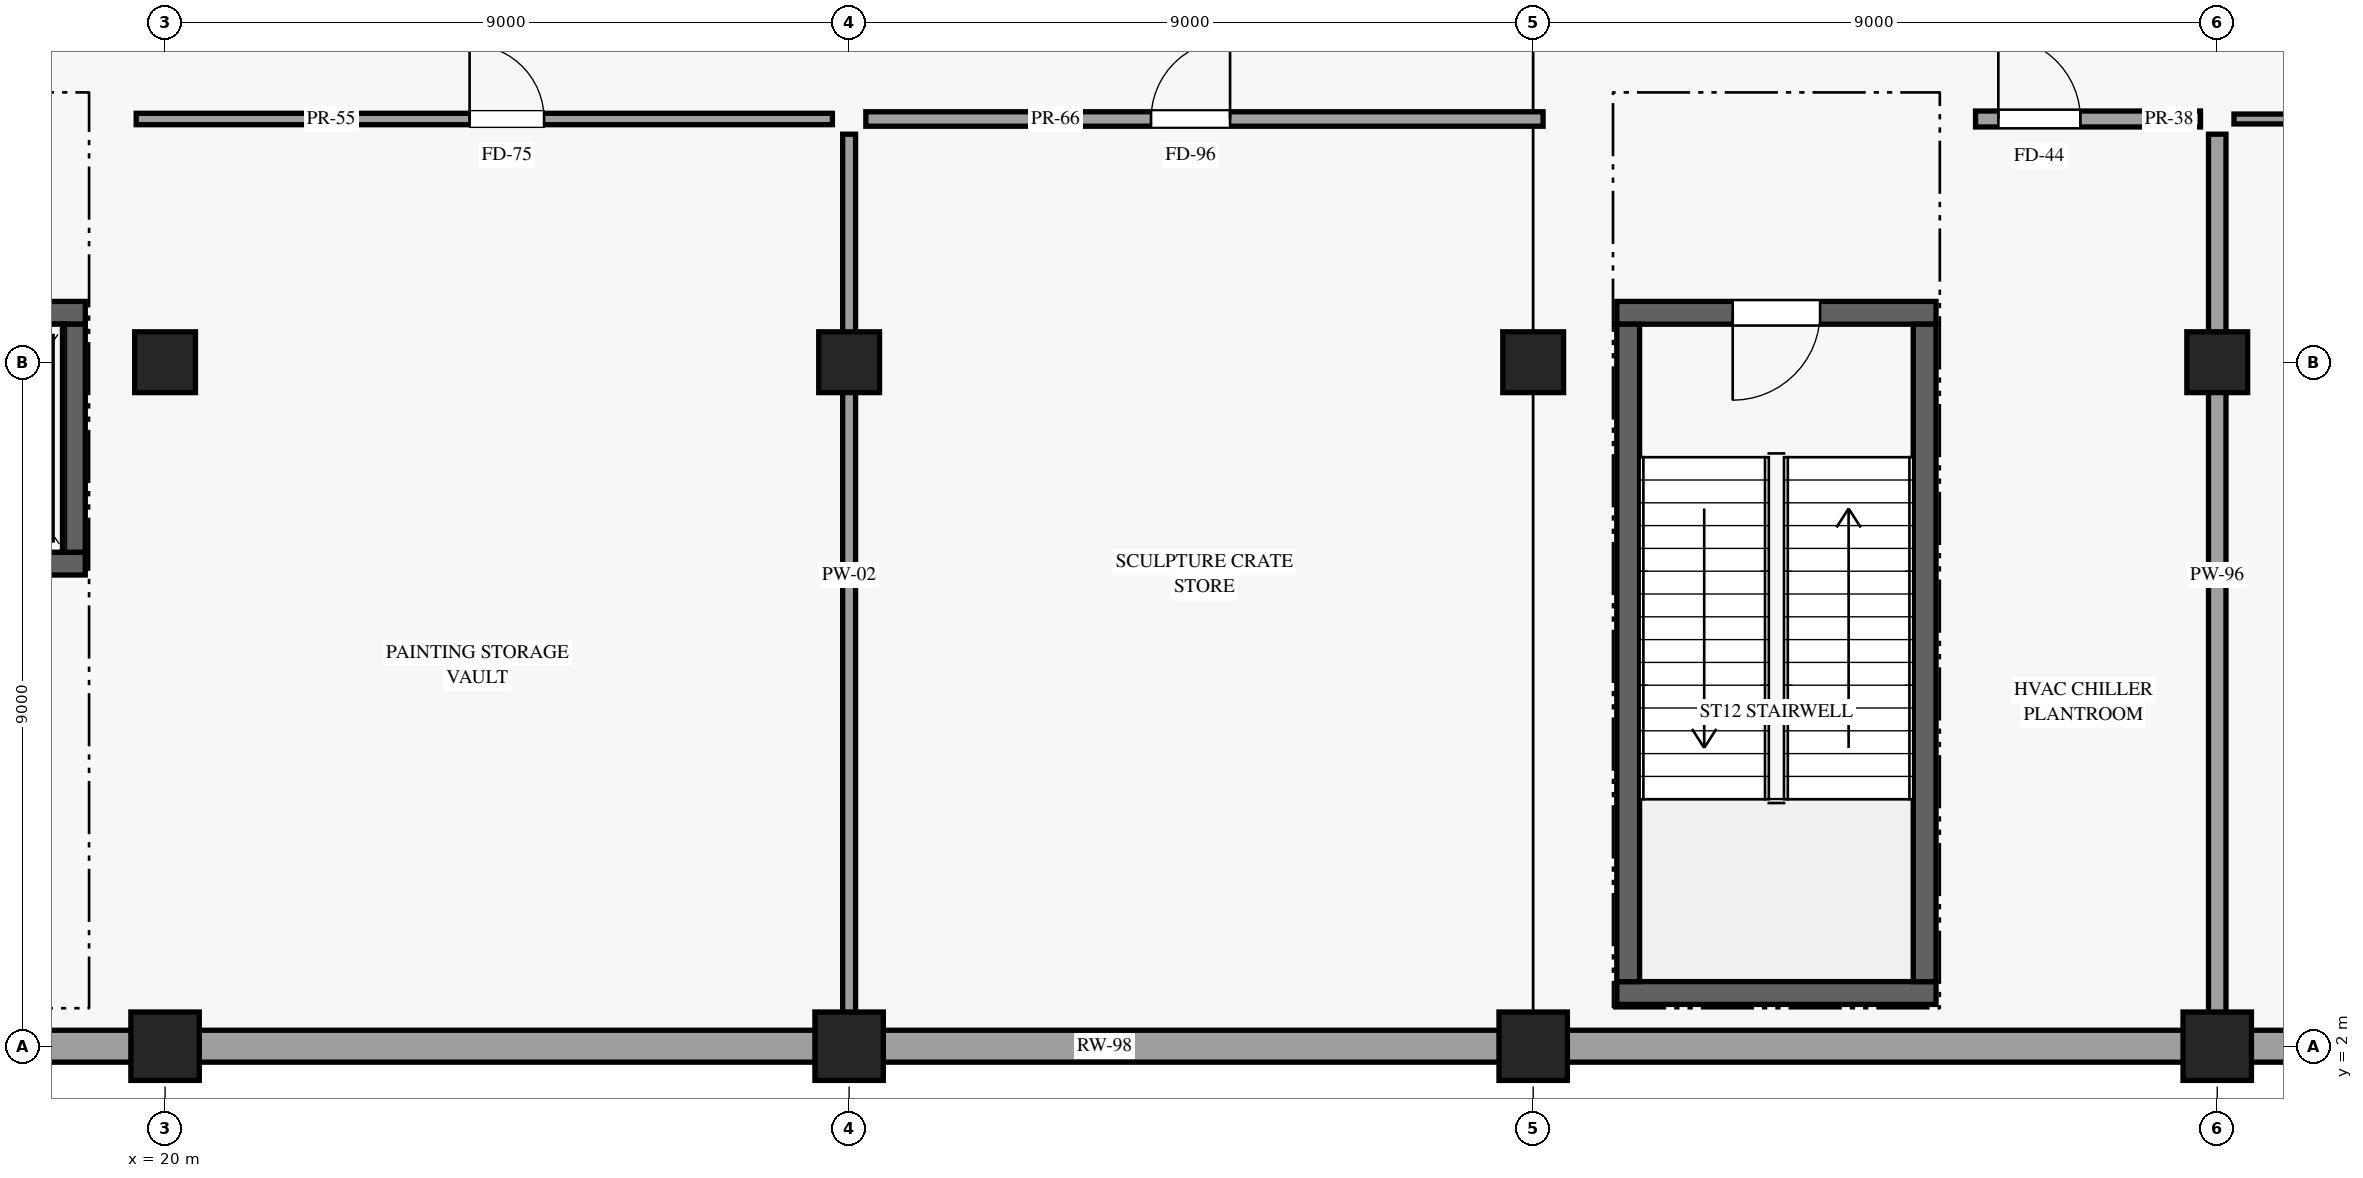
"""IFC4 building model, lengths in metres.
Left out: names, types, materials, properties, quantities, classifications, styles, units other than length and angle.
Written with IfcOpenShell. Run it as: python <this file> out.ifc"""

import sys

from ifc_helpers import new_model, si_unit, direction, frame, frame_2d, origin, origin_2d, place, context, subcontext, project, spatial, rectangle, extrude, element, fill, save


model = new_model("IFC4")
c1 = context("Model", 3, precision=1e-05, world=origin(), true_north=direction((0.0, 1.0)))
c2 = subcontext(c1, "Body", "Model", "MODEL_VIEW")
j1 = project(units=[si_unit("LENGTHUNIT", "METRE"), si_unit("PLANEANGLEUNIT", "RADIAN")], contexts=[c1])
p1 = place(None, origin())
s1 = spatial("IfcSite", under=j1, at=p1, CompositionType="ELEMENT")
p2 = place(p1, origin())
s2 = spatial("IfcBuilding", under=s1, at=p2, CompositionType="ELEMENT")
p3 = place(p2, frame((0.0, 0.0, -4.8)))
s3 = spatial("IfcBuildingStorey", under=s2, at=p3, CompositionType="ELEMENT", Elevation=-4.8)
p4 = place(p3, frame((20.0, 2.0, 0.0), z_axis=(0.0, 0.0, 1.0), x_axis=(1.0, 0.0, 0.0)))
e1 = element("IfcColumn", 1, at=p4, inside=s3, PredefinedType="COLUMN", context=c2, shape_type="SweptSolid", body=[
    extrude(rectangle(XDim=0.9, YDim=0.9, at=origin_2d()), origin(), (0.0, 0.0, 1.0), 4.8),
])
p5 = place(p3, frame((20.0, 11.0, 0.0), z_axis=(0.0, 0.0, 1.0), x_axis=(1.0, 0.0, 0.0)))
e2 = element("IfcColumn", 2, at=p5, inside=s3, PredefinedType="COLUMN", context=c2, shape_type="SweptSolid", body=[
    extrude(rectangle(XDim=0.8, YDim=0.8, at=origin_2d()), origin(), (0.0, 0.0, 1.0), 4.8),
])
p6 = place(p3, frame((29.0, 2.0, 0.0), z_axis=(0.0, 0.0, 1.0), x_axis=(1.0, 0.0, 0.0)))
e3 = element("IfcColumn", 3, at=p6, inside=s3, PredefinedType="COLUMN", context=c2, shape_type="SweptSolid", body=[
    extrude(rectangle(XDim=0.9, YDim=0.9, at=origin_2d()), origin(), (0.0, 0.0, 1.0), 4.8),
])
p7 = place(p3, frame((29.0, 11.0, 0.0), z_axis=(0.0, 0.0, 1.0), x_axis=(1.0, 0.0, 0.0)))
e4 = element("IfcColumn", 4, at=p7, inside=s3, PredefinedType="COLUMN", context=c2, shape_type="SweptSolid", body=[
    extrude(rectangle(XDim=0.8, YDim=0.8, at=origin_2d()), origin(), (0.0, 0.0, 1.0), 4.8),
])
p8 = place(p3, frame((38.0, 2.0, 0.0), z_axis=(0.0, 0.0, 1.0), x_axis=(1.0, 0.0, 0.0)))
e5 = element("IfcColumn", 5, at=p8, inside=s3, PredefinedType="COLUMN", context=c2, shape_type="SweptSolid", body=[
    extrude(rectangle(XDim=0.9, YDim=0.9, at=origin_2d()), origin(), (0.0, 0.0, 1.0), 4.8),
])
p9 = place(p3, frame((38.0, 11.0, 0.0), z_axis=(0.0, 0.0, 1.0), x_axis=(1.0, 0.0, 0.0)))
e6 = element("IfcColumn", 6, at=p9, inside=s3, PredefinedType="COLUMN", context=c2, shape_type="SweptSolid", body=[
    extrude(rectangle(XDim=0.8, YDim=0.8, at=origin_2d()), origin(), (0.0, 0.0, 1.0), 4.8),
])
p10 = place(p3, frame((47.0, 2.0, 0.0), z_axis=(0.0, 0.0, 1.0), x_axis=(1.0, 0.0, 0.0)))
e7 = element("IfcColumn", 7, at=p10, inside=s3, PredefinedType="COLUMN", context=c2, shape_type="SweptSolid", body=[
    extrude(rectangle(XDim=0.9, YDim=0.9, at=origin_2d()), origin(), (0.0, 0.0, 1.0), 4.8),
])
p11 = place(p3, frame((47.0, 11.0, 0.0), z_axis=(0.0, 0.0, 1.0), x_axis=(1.0, 0.0, 0.0)))
e8 = element("IfcColumn", 8, at=p11, inside=s3, PredefinedType="COLUMN", context=c2, shape_type="SweptSolid", body=[
    extrude(rectangle(XDim=0.8, YDim=0.8, at=origin_2d()), origin(), (0.0, 0.0, 1.0), 4.8),
])
p12 = place(p3, frame((10.79, 2.0, 0.0), z_axis=(0.0, 0.0, 1.0), x_axis=(1.0, 0.0, 0.0)))
e9 = element("IfcWall", 9, at=p12, inside=s3, PredefinedType="SOLIDWALL", context=c2, shape_type="SweptSolid", body=[
    extrude(rectangle(XDim=45.42, YDim=0.42, at=frame_2d((22.71, 0.0))), origin(), (0.0, 0.0, 1.0), 3.215),
])
p13 = place(p3, frame((16.35, 11.65, 0.0), z_axis=(0.0, 0.0, 1.0), x_axis=(1.0, 0.0, 0.0)))
e10 = element("IfcWall", 10, at=p13, inside=s3, PredefinedType="SHEAR", context=c2, shape_type="SweptSolid", body=[
    extrude(rectangle(XDim=2.6, YDim=0.3, at=frame_2d((1.3, 0.0))), origin(), (0.0, 0.0, 1.0), 4.48),
])
p14 = place(p13, frame((0.75, 0.0, 0.0)))
e11 = element("IfcOpeningElement", 11, at=p14, cuts=e10, PredefinedType="OPENING", context=c2, shape_type="SweptSolid", body=[
    extrude(rectangle(XDim=1.1, YDim=2.2, at=frame_2d((0.55, 1.1))), frame((0.0, 0.16, 0.0), z_axis=(0.0, -1.0, 0.0), x_axis=(1.0, 0.0, 0.0)), (0.0, 0.0, 1.0), 0.32),
])
p15 = place(p3, frame((16.35, 8.35, 0.0), z_axis=(0.0, 0.0, 1.0), x_axis=(1.0, 0.0, 0.0)))
e12 = element("IfcWall", 12, at=p15, inside=s3, PredefinedType="SHEAR", context=c2, shape_type="SweptSolid", body=[
    extrude(rectangle(XDim=2.6, YDim=0.3, at=frame_2d((1.3, 0.0))), origin(), (0.0, 0.0, 1.0), 4.48),
])
p16 = place(p3, frame((18.8, 8.5, 0.0), z_axis=(0.0, 0.0, 1.0), x_axis=(0.0, 1.0, 0.0)))
e13 = element("IfcWall", 13, at=p16, inside=s3, PredefinedType="SHEAR", context=c2, shape_type="SweptSolid", body=[
    extrude(rectangle(XDim=3.0, YDim=0.3, at=frame_2d((1.5, 0.0))), origin(), (0.0, 0.0, 1.0), 4.48),
])
p17 = place(p3, frame((39.1, 11.65, 0.0), z_axis=(0.0, 0.0, 1.0), x_axis=(1.0, 0.0, 0.0)))
e14 = element("IfcWall", 14, at=p17, inside=s3, PredefinedType="SHEAR", context=c2, shape_type="SweptSolid", body=[
    extrude(rectangle(XDim=4.2, YDim=0.3, at=frame_2d((2.1, 0.0))), origin(), (0.0, 0.0, 1.0), 4.48),
])
p18 = place(p17, frame((2.675, 0.0, 0.0), z_axis=(0.0, 0.0, 1.0), x_axis=(-1.0, 0.0, 0.0)))
e15 = element("IfcOpeningElement", 15, at=p18, cuts=e14, PredefinedType="OPENING", context=c2, shape_type="SweptSolid", body=[
    extrude(rectangle(XDim=1.15, YDim=2.2, at=frame_2d((0.575, 1.1))), frame((0.0, 0.16, 0.0), z_axis=(0.0, -1.0, 0.0), x_axis=(1.0, 0.0, 0.0)), (0.0, 0.0, 1.0), 0.32),
])
p19 = place(p3, frame((39.1, 2.7, 0.0), z_axis=(0.0, 0.0, 1.0), x_axis=(1.0, 0.0, 0.0)))
e16 = element("IfcWall", 16, at=p19, inside=s3, PredefinedType="SHEAR", context=c2, shape_type="SweptSolid", body=[
    extrude(rectangle(XDim=4.2, YDim=0.3, at=frame_2d((2.1, 0.0))), origin(), (0.0, 0.0, 1.0), 4.48),
])
for number, where, z_axis, x_axis in (
    (17, (39.25, 2.85, 0.0), (0.0, 0.0, 1.0), (0.0, 1.0, 0.0)),
    (18, (43.15, 2.85, 0.0), (0.0, 0.0, 1.0), (0.0, 1.0, 0.0)),
):
    element("IfcWall", number, at=place(p3, frame(where, z_axis=z_axis, x_axis=x_axis)), inside=s3, PredefinedType="SHEAR", context=c2, shape_type="SweptSolid", body=[
        extrude(rectangle(XDim=8.65, YDim=0.3, at=frame_2d((4.325, 0.0))), origin(), (0.0, 0.0, 1.0), 4.48),
    ])
p20 = place(p3, frame((19.62, 14.2, 0.0), z_axis=(0.0, 0.0, 1.0), x_axis=(1.0, 0.0, 0.0)))
e19 = element("IfcWall", 19, at=p20, inside=s3, PredefinedType="PARTITIONING", context=c2, shape_type="SweptSolid", body=[
    extrude(rectangle(XDim=9.16, YDim=0.15, at=frame_2d((4.58, 0.0))), origin(), (0.0, 0.0, 1.0), 3.415),
])
p21 = place(p20, frame((4.386, 0.0, 0.0)))
e20 = element("IfcOpeningElement", 20, at=p21, cuts=e19, PredefinedType="OPENING", context=c2, shape_type="SweptSolid", body=[
    extrude(rectangle(XDim=0.98, YDim=2.18, at=frame_2d((0.49, 1.09))), frame((0.0, 0.085, 0.0), z_axis=(0.0, -1.0, 0.0), x_axis=(1.0, 0.0, 0.0)), (0.0, 0.0, 1.0), 0.17),
])
p22 = place(p3, frame((29.0, 2.4, 0.0), z_axis=(0.0, 0.0, 1.0), x_axis=(0.0, 1.0, 0.0)))
e21 = element("IfcWall", 21, at=p22, inside=s3, PredefinedType="PARTITIONING", context=c2, shape_type="SweptSolid", body=[
    extrude(rectangle(XDim=11.6, YDim=0.17, at=frame_2d((5.8, 0.0))), origin(), (0.0, 0.0, 1.0), 3.415),
])
p23 = place(p3, frame((29.22, 14.2, 0.0), z_axis=(0.0, 0.0, 1.0), x_axis=(1.0, 0.0, 0.0)))
e22 = element("IfcWall", 22, at=p23, inside=s3, PredefinedType="PARTITIONING", context=c2, shape_type="SweptSolid", body=[
    extrude(rectangle(XDim=8.91, YDim=0.19, at=frame_2d((4.455, 0.0))), origin(), (0.0, 0.0, 1.0), 3.415),
])
p24 = place(p23, frame((3.752, 0.0, 0.0)))
e23 = element("IfcOpeningElement", 23, at=p24, cuts=e22, PredefinedType="OPENING", context=c2, shape_type="SweptSolid", body=[
    extrude(rectangle(XDim=1.04, YDim=2.22, at=frame_2d((0.52, 1.11))), frame((0.0, 0.105, 0.0), z_axis=(0.0, -1.0, 0.0), x_axis=(1.0, 0.0, 0.0)), (0.0, 0.0, 1.0), 0.21),
])
p25 = place(p3, frame((43.82, 14.2, 0.0), z_axis=(0.0, 0.0, 1.0), x_axis=(1.0, 0.0, 0.0)))
e24 = element("IfcWall", 24, at=p25, inside=s3, PredefinedType="PARTITIONING", context=c2, shape_type="SweptSolid", body=[
    extrude(rectangle(XDim=2.96, YDim=0.21, at=frame_2d((1.48, 0.0))), origin(), (0.0, 0.0, 1.0), 3.415),
])
p26 = place(p25, frame((0.3, 0.0, 0.0)))
e25 = element("IfcOpeningElement", 25, at=p26, cuts=e24, PredefinedType="OPENING", context=c2, shape_type="SweptSolid", body=[
    extrude(rectangle(XDim=1.08, YDim=2.24, at=frame_2d((0.54, 1.12))), frame((0.0, 0.115, 0.0), z_axis=(0.0, -1.0, 0.0), x_axis=(1.0, 0.0, 0.0)), (0.0, 0.0, 1.0), 0.23),
])
p27 = place(p3, frame((47.0, 2.4, 0.0), z_axis=(0.0, 0.0, 1.0), x_axis=(0.0, 1.0, 0.0)))
e26 = element("IfcWall", 26, at=p27, inside=s3, PredefinedType="PARTITIONING", context=c2, shape_type="SweptSolid", body=[
    extrude(rectangle(XDim=11.6, YDim=0.23, at=frame_2d((5.8, 0.0))), origin(), (0.0, 0.0, 1.0), 3.415),
])
p28 = place(p3, frame((47.22, 14.2, 0.0), z_axis=(0.0, 0.0, 1.0), x_axis=(1.0, 0.0, 0.0)))
e27 = element("IfcWall", 27, at=p28, inside=s3, PredefinedType="PARTITIONING", context=c2, shape_type="SweptSolid", body=[
    extrude(rectangle(XDim=8.24, YDim=0.13, at=frame_2d((4.12, 0.0))), origin(), (0.0, 0.0, 1.0), 3.415),
])
p29 = place(p28, frame((3.721, 0.0, 0.0)))
e28 = element("IfcOpeningElement", 28, at=p29, cuts=e27, PredefinedType="OPENING", context=c2, shape_type="SweptSolid", body=[
    extrude(rectangle(XDim=1.16, YDim=2.28, at=frame_2d((0.58, 1.14))), frame((0.0, 0.075, 0.0), z_axis=(0.0, -1.0, 0.0), x_axis=(1.0, 0.0, 0.0)), (0.0, 0.0, 1.0), 0.15),
])
p30 = place(p18, origin())
e29 = element("IfcDoor", 29, at=p30, inside=s3, OperationType="SINGLE_SWING_RIGHT", PredefinedType="DOOR", context=c2, shape_type="SweptSolid", body=[
    extrude(rectangle(XDim=1.15, YDim=2.2, at=frame_2d((0.575, 1.1))), frame((0.0, 0.025, 0.0), z_axis=(0.0, -1.0, 0.0), x_axis=(1.0, 0.0, 0.0)), (0.0, 0.0, 1.0), 0.05),
])
fill(e15, e29)
p31 = place(p21, origin())
e30 = element("IfcDoor", 30, at=p31, inside=s3, OperationType="SINGLE_SWING_LEFT", PredefinedType="DOOR", context=c2, shape_type="SweptSolid", body=[
    extrude(rectangle(XDim=0.98, YDim=2.18, at=frame_2d((0.49, 1.09))), frame((0.0, 0.025, 0.0), z_axis=(0.0, -1.0, 0.0), x_axis=(1.0, 0.0, 0.0)), (0.0, 0.0, 1.0), 0.05),
])
fill(e20, e30)
p32 = place(p24, origin())
e31 = element("IfcDoor", 31, at=p32, inside=s3, OperationType="SINGLE_SWING_RIGHT", PredefinedType="DOOR", context=c2, shape_type="SweptSolid", body=[
    extrude(rectangle(XDim=1.04, YDim=2.22, at=frame_2d((0.52, 1.11))), frame((0.0, 0.025, 0.0), z_axis=(0.0, -1.0, 0.0), x_axis=(1.0, 0.0, 0.0)), (0.0, 0.0, 1.0), 0.05),
])
fill(e23, e31)
p33 = place(p26, origin())
e32 = element("IfcDoor", 32, at=p33, inside=s3, OperationType="SINGLE_SWING_LEFT", PredefinedType="DOOR", context=c2, shape_type="SweptSolid", body=[
    extrude(rectangle(XDim=1.08, YDim=2.24, at=frame_2d((0.54, 1.12))), frame((0.0, 0.025, 0.0), z_axis=(0.0, -1.0, 0.0), x_axis=(1.0, 0.0, 0.0)), (0.0, 0.0, 1.0), 0.05),
])
fill(e25, e32)
save(model, sys.argv[1])
